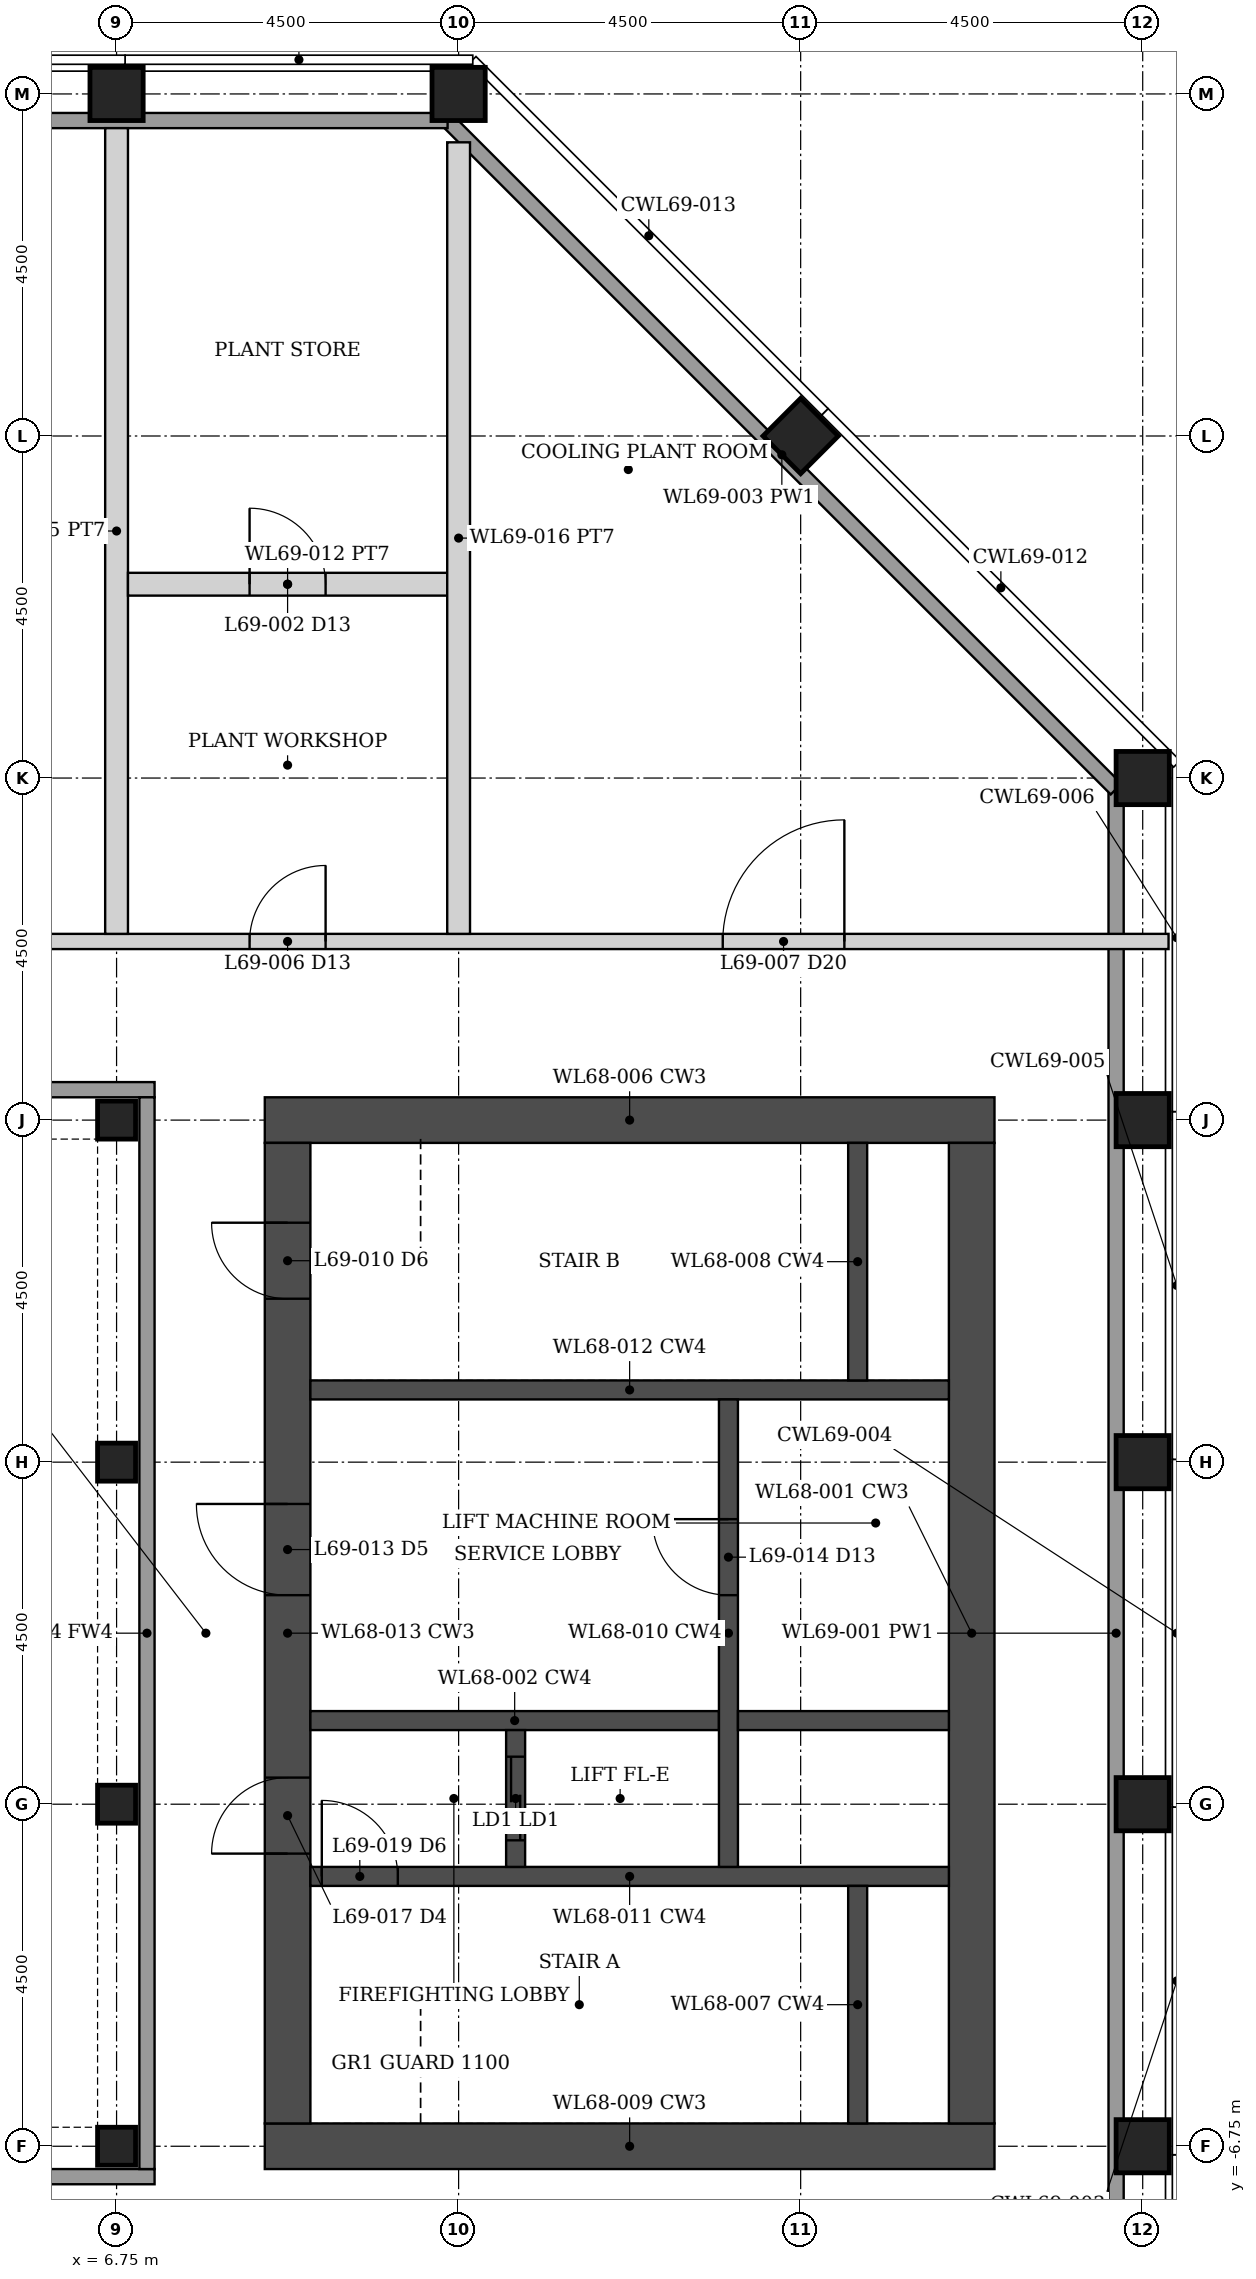
"""IFC4 building model, lengths in metres.
Left out: names, types, materials, properties, quantities, classifications, styles, units other than length and angle.
Written with IfcOpenShell. Run it as: python <this file> out.ifc"""

import sys

from ifc_helpers import new_model, si_unit, direction, frame, frame_2d, origin, origin_2d, place, context, subcontext, project, spatial, rectangle, hollow_rectangle, extrude, element, fill, save


model = new_model("IFC4")
c1 = context("Model", 3, precision=1e-05, world=origin(), true_north=direction((0.0, 1.0)))
c2 = subcontext(c1, "Body", "Model", "MODEL_VIEW")
j1 = project(units=[si_unit("LENGTHUNIT", "METRE"), si_unit("PLANEANGLEUNIT", "RADIAN")], contexts=[c1])
p1 = place(None, origin())
s1 = spatial("IfcSite", under=j1, at=p1, CompositionType="ELEMENT")
p2 = place(p1, origin())
s2 = spatial("IfcBuilding", under=s1, at=p2, CompositionType="ELEMENT")
p3 = place(p2, frame((0.0, 0.0, 268.05)))
s3 = spatial("IfcBuildingStorey", under=s2, at=p3, CompositionType="ELEMENT", Elevation=268.05)
for number, where, z_axis, x_axis in (
    (1, (20.25, -6.75, 0.0), (0.0, 0.0, 1.0), (1.0, 0.0, 0.0)),
    (2, (20.25, -2.25, 0.0), (0.0, 0.0, 1.0), (1.0, 0.0, 0.0)),
    (3, (20.25, 2.25, 0.0), (0.0, 0.0, 1.0), (1.0, 0.0, 0.0)),
    (4, (6.75, 20.25, 0.0), (0.0, 0.0, 1.0), (0.0, 1.0, 0.0)),
    (5, (20.25, 6.75, 0.0), (0.0, 0.0, 1.0), (1.0, 0.0, 0.0)),
    (6, (11.25, 20.25, 0.0), (0.0, 0.0, 1.0), (0.0, 1.0, 0.0)),
    (7, (20.25, 11.25, 0.0), (0.0, 0.0, 1.0), (1.0, 0.0, 0.0)),
    (8, (15.75, 15.75, 0.0), (0.0, 0.0, 1.0), (0.707, 0.707, 0.0)),
):
    element("IfcColumn", number, at=place(p3, frame(where, z_axis=z_axis, x_axis=x_axis)), inside=s3, PredefinedType="COLUMN", context=c2, shape_type="SweptSolid", body=[
        extrude(hollow_rectangle(XDim=0.7, YDim=0.7, WallThickness=0.035, at=origin_2d()), origin(), (0.0, 0.0, 1.0), 6.0),
    ])
for number, where, z_axis, x_axis in (
    (9, (6.75, -6.75, 0.0), (0.0, 0.0, 1.0), (1.0, 0.0, 0.0)),
    (10, (6.75, -2.25, 0.0), (0.0, 0.0, 1.0), (1.0, 0.0, 0.0)),
    (11, (6.75, 2.25, 0.0), (0.0, 0.0, 1.0), (1.0, 0.0, 0.0)),
    (12, (6.75, 6.75, 0.0), (0.0, 0.0, 1.0), (1.0, 0.0, 0.0)),
):
    element("IfcColumn", number, at=place(p3, frame(where, z_axis=z_axis, x_axis=x_axis)), inside=s3, PredefinedType="COLUMN", context=c2, shape_type="SweptSolid", body=[
        extrude(hollow_rectangle(XDim=0.5, YDim=0.5, WallThickness=0.025, at=origin_2d()), origin(), (0.0, 0.0, 1.0), 6.0),
    ])
for number, where, z_axis, x_axis in (
    (13, (8.7, -6.75, 0.0), (0.0, 0.0, 1.0), (1.0, 0.0, 0.0)),
    (14, (8.7, 6.75, 0.0), (0.0, 0.0, 1.0), (1.0, 0.0, 0.0)),
):
    element("IfcWall", number, at=place(p3, frame(where, z_axis=z_axis, x_axis=x_axis)), inside=s3, PredefinedType="SHEAR", context=c2, shape_type="SweptSolid", body=[
        extrude(rectangle(XDim=9.6, YDim=0.6, at=frame_2d((4.8, 0.0))), origin(), (0.0, 0.0, 1.0), 6.0),
    ])
p4 = place(p3, frame((9.0, -6.45, 0.0), z_axis=(0.0, 0.0, 1.0), x_axis=(0.0, 1.0, 0.0)))
e15 = element("IfcWall", 15, at=p4, inside=s3, PredefinedType="SHEAR", context=c2, shape_type="SweptSolid", body=[
    extrude(rectangle(XDim=12.9, YDim=0.6, at=frame_2d((6.45, 0.0))), origin(), (0.0, 0.0, 1.0), 6.0),
])
p5 = place(p4, frame((3.55, 0.0, 0.0)))
e16 = element("IfcOpeningElement", 16, at=p5, cuts=e15, PredefinedType="OPENING", context=c2, shape_type="SweptSolid", body=[
    extrude(rectangle(XDim=1.0, YDim=2.1, at=frame_2d((0.5, 1.05))), frame((0.0, 0.31, 0.0), z_axis=(0.0, -1.0, 0.0), x_axis=(1.0, 0.0, 0.0)), (0.0, 0.0, 1.0), 0.62),
])
p6 = place(p4, frame((6.95, 0.0, 0.0)))
e17 = element("IfcOpeningElement", 17, at=p6, cuts=e15, PredefinedType="OPENING", context=c2, shape_type="SweptSolid", body=[
    extrude(rectangle(XDim=1.2, YDim=2.1, at=frame_2d((0.6, 1.05))), frame((0.0, 0.31, 0.0), z_axis=(0.0, -1.0, 0.0), x_axis=(1.0, 0.0, 0.0)), (0.0, 0.0, 1.0), 0.62),
])
p7 = place(p4, frame((10.85, 0.0, 0.0)))
e18 = element("IfcOpeningElement", 18, at=p7, cuts=e15, PredefinedType="OPENING", context=c2, shape_type="SweptSolid", body=[
    extrude(rectangle(XDim=1.0, YDim=2.1, at=frame_2d((0.5, 1.05))), frame((0.0, 0.31, 0.0), z_axis=(0.0, -1.0, 0.0), x_axis=(1.0, 0.0, 0.0)), (0.0, 0.0, 1.0), 0.62),
])
p8 = place(p3, frame((18.0, -6.45, 0.0), z_axis=(0.0, 0.0, 1.0), x_axis=(0.0, 1.0, 0.0)))
e19 = element("IfcWall", 19, at=p8, inside=s3, PredefinedType="SHEAR", context=c2, shape_type="SweptSolid", body=[
    extrude(rectangle(XDim=12.9, YDim=0.6, at=frame_2d((6.45, 0.0))), origin(), (0.0, 0.0, 1.0), 6.0),
])
p9 = place(p3, frame((9.3, -3.2, 0.0), z_axis=(0.0, 0.0, 1.0), x_axis=(1.0, 0.0, 0.0)))
e20 = element("IfcWall", 20, at=p9, inside=s3, PredefinedType="SHEAR", context=c2, shape_type="SweptSolid", body=[
    extrude(rectangle(XDim=8.4, YDim=0.25, at=frame_2d((4.2, 0.0))), origin(), (0.0, 0.0, 1.0), 6.0),
])
p10 = place(p9, frame((0.15, 0.0, 0.0)))
e21 = element("IfcOpeningElement", 21, at=p10, cuts=e20, PredefinedType="OPENING", context=c2, shape_type="SweptSolid", body=[
    extrude(rectangle(XDim=1.0, YDim=2.1, at=frame_2d((0.5, 1.05))), frame((0.0, 0.135, 0.0), z_axis=(0.0, -1.0, 0.0), x_axis=(1.0, 0.0, 0.0)), (0.0, 0.0, 1.0), 0.27),
])
p11 = place(p3, frame((9.3, 3.2, 0.0), z_axis=(0.0, 0.0, 1.0), x_axis=(1.0, 0.0, 0.0)))
e22 = element("IfcWall", 22, at=p11, inside=s3, PredefinedType="SHEAR", context=c2, shape_type="SweptSolid", body=[
    extrude(rectangle(XDim=8.4, YDim=0.25, at=frame_2d((4.2, 0.0))), origin(), (0.0, 0.0, 1.0), 6.0),
])
for number, where, z_axis, x_axis in (
    (23, (16.5, -6.45, 0.0), (0.0, 0.0, 1.0), (0.0, 1.0, 0.0)),
    (24, (16.5, 3.325, 0.0), (0.0, 0.0, 1.0), (0.0, 1.0, 0.0)),
):
    element("IfcWall", number, at=place(p3, frame(where, z_axis=z_axis, x_axis=x_axis)), inside=s3, PredefinedType="SHEAR", context=c2, shape_type="SweptSolid", body=[
        extrude(rectangle(XDim=3.125, YDim=0.25, at=frame_2d((1.562, 0.0))), origin(), (0.0, 0.0, 1.0), 6.0),
    ])
p12 = place(p3, frame((9.3, -1.15, 0.0), z_axis=(0.0, 0.0, 1.0), x_axis=(1.0, 0.0, 0.0)))
e25 = element("IfcWall", 25, at=p12, inside=s3, PredefinedType="SHEAR", context=c2, shape_type="SweptSolid", body=[
    extrude(rectangle(XDim=5.375, YDim=0.25, at=frame_2d((2.688, 0.0))), origin(), (0.0, 0.0, 1.0), 6.0),
])
p13 = place(p3, frame((12.0, -3.075, 0.0), z_axis=(0.0, 0.0, 1.0), x_axis=(0.0, 1.0, 0.0)))
e26 = element("IfcWall", 26, at=p13, inside=s3, PredefinedType="SHEAR", context=c2, shape_type="SweptSolid", body=[
    extrude(rectangle(XDim=1.8, YDim=0.25, at=frame_2d((0.9, 0.0))), origin(), (0.0, 0.0, 1.0), 6.0),
])
p14 = place(p13, frame((0.35, 0.0, 0.0)))
e27 = element("IfcOpeningElement", 27, at=p14, cuts=e26, PredefinedType="OPENING", context=c2, shape_type="SweptSolid", body=[
    extrude(rectangle(XDim=1.1, YDim=2.1, at=frame_2d((0.55, 1.05))), frame((0.0, 0.135, 0.0), z_axis=(0.0, -1.0, 0.0), x_axis=(1.0, 0.0, 0.0)), (0.0, 0.0, 1.0), 0.27),
])
p15 = place(p3, frame((14.8, -3.075, 0.0), z_axis=(0.0, 0.0, 1.0), x_axis=(0.0, 1.0, 0.0)))
e28 = element("IfcWall", 28, at=p15, inside=s3, PredefinedType="SHEAR", context=c2, shape_type="SweptSolid", body=[
    extrude(rectangle(XDim=6.15, YDim=0.25, at=frame_2d((3.075, 0.0))), origin(), (0.0, 0.0, 1.0), 6.0),
])
p16 = place(p15, frame((3.575, 0.0, 0.0)))
e29 = element("IfcOpeningElement", 29, at=p16, cuts=e28, PredefinedType="OPENING", context=c2, shape_type="SweptSolid", body=[
    extrude(rectangle(XDim=1.0, YDim=2.1, at=frame_2d((0.5, 1.05))), frame((0.0, 0.135, 0.0), z_axis=(0.0, -1.0, 0.0), x_axis=(1.0, 0.0, 0.0)), (0.0, 0.0, 1.0), 0.27),
])
p17 = place(p3, frame((14.925, -1.15, 0.0), z_axis=(0.0, 0.0, 1.0), x_axis=(1.0, 0.0, 0.0)))
e30 = element("IfcWall", 30, at=p17, inside=s3, PredefinedType="SHEAR", context=c2, shape_type="SweptSolid", body=[
    extrude(rectangle(XDim=2.775, YDim=0.25, at=frame_2d((1.387, 0.0))), origin(), (0.0, 0.0, 1.0), 6.0),
])
for number, where, z_axis, x_axis in (
    (31, (-7.25, 7.15, 0.0), (0.0, 0.0, 1.0), (1.0, 0.0, 0.0)),
    (32, (-7.25, -7.15, 0.0), (0.0, 0.0, 1.0), (1.0, 0.0, 0.0)),
):
    element("IfcWall", number, at=place(p3, frame(where, z_axis=z_axis, x_axis=x_axis)), inside=s3, PredefinedType="SOLIDWALL", context=c2, shape_type="SweptSolid", body=[
        extrude(rectangle(XDim=14.5, YDim=0.2, at=frame_2d((7.25, 0.0))), origin(), (0.0, 0.0, 1.0), 4.829),
    ])
p18 = place(p3, frame((7.15, -7.05, 0.0), z_axis=(0.0, 0.0, 1.0), x_axis=(0.0, 1.0, 0.0)))
e33 = element("IfcWall", 33, at=p18, inside=s3, PredefinedType="SOLIDWALL", context=c2, shape_type="SweptSolid", body=[
    extrude(rectangle(XDim=14.1, YDim=0.2, at=frame_2d((7.05, 0.0))), origin(), (0.0, 0.0, 1.0), 4.829),
])
p19 = place(p3, frame((19.9, -11.105, 6.0), z_axis=(0.0, 0.0, 1.0), x_axis=(0.0, 1.0, 0.0)))
e34 = element("IfcWall", 34, at=p19, inside=s3, PredefinedType="PARAPET", context=c2, shape_type="SweptSolid", body=[
    extrude(rectangle(XDim=22.21, YDim=0.2, at=frame_2d((11.105, 0.0))), origin(), (0.0, 0.0, 1.0), 1.1),
])
p20 = place(p3, frame((11.105, 19.9, 6.0), z_axis=(0.0, 0.0, 1.0), x_axis=(0.707106781187, -0.707106781187, 0.0)))
e35 = element("IfcWall", 35, at=p20, inside=s3, PredefinedType="PARAPET", context=c2, shape_type="SweptSolid", body=[
    extrude(rectangle(XDim=12.438, YDim=0.2, at=frame_2d((6.219, 0.0))), origin(), (0.0, 0.0, 1.0), 1.1),
])
p21 = place(p3, frame((-11.105, 19.9, 6.0), z_axis=(0.0, 0.0, 1.0), x_axis=(1.0, 0.0, 0.0)))
e36 = element("IfcWall", 36, at=p21, inside=s3, PredefinedType="PARAPET", context=c2, shape_type="SweptSolid", body=[
    extrude(rectangle(XDim=22.21, YDim=0.2, at=frame_2d((11.105, 0.0))), origin(), (0.0, 0.0, 1.0), 1.1),
])
p22 = place(p3, frame((-20.59, 9.1, 0.0), z_axis=(0.0, 0.0, 1.0), x_axis=(1.0, 0.0, 0.0)))
e37 = element("IfcWall", 37, at=p22, inside=s3, PredefinedType="PARTITIONING", context=c2, shape_type="SweptSolid", body=[
    extrude(rectangle(XDim=41.18, YDim=0.2, at=frame_2d((20.59, 0.0))), origin(), (0.0, 0.0, 1.0), 4.829),
])
p23 = place(p22, frame((4.265, 0.0, 0.0)))
e38 = element("IfcOpeningElement", 38, at=p23, cuts=e37, PredefinedType="OPENING", context=c2, shape_type="SweptSolid", body=[
    extrude(rectangle(XDim=1.6, YDim=2.4, at=frame_2d((0.8, 1.2))), frame((0.0, 0.11, 0.0), z_axis=(0.0, -1.0, 0.0), x_axis=(1.0, 0.0, 0.0)), (0.0, 0.0, 1.0), 0.22),
])
p24 = place(p22, frame((13.34, 0.0, 0.0)))
e39 = element("IfcOpeningElement", 39, at=p24, cuts=e37, PredefinedType="OPENING", context=c2, shape_type="SweptSolid", body=[
    extrude(rectangle(XDim=1.0, YDim=2.1, at=frame_2d((0.5, 1.05))), frame((0.0, 0.11, 0.0), z_axis=(0.0, -1.0, 0.0), x_axis=(1.0, 0.0, 0.0)), (0.0, 0.0, 1.0), 0.22),
])
p25 = place(p22, frame((22.04, 0.0, 0.0)))
e40 = element("IfcOpeningElement", 40, at=p25, cuts=e37, PredefinedType="OPENING", context=c2, shape_type="SweptSolid", body=[
    extrude(rectangle(XDim=1.6, YDim=2.4, at=frame_2d((0.8, 1.2))), frame((0.0, 0.11, 0.0), z_axis=(0.0, -1.0, 0.0), x_axis=(1.0, 0.0, 0.0)), (0.0, 0.0, 1.0), 0.22),
])
p26 = place(p22, frame((29.09, 0.0, 0.0)))
e41 = element("IfcOpeningElement", 41, at=p26, cuts=e37, PredefinedType="OPENING", context=c2, shape_type="SweptSolid", body=[
    extrude(rectangle(XDim=1.0, YDim=2.1, at=frame_2d((0.5, 1.05))), frame((0.0, 0.11, 0.0), z_axis=(0.0, -1.0, 0.0), x_axis=(1.0, 0.0, 0.0)), (0.0, 0.0, 1.0), 0.22),
])
p27 = place(p22, frame((35.315, 0.0, 0.0)))
e42 = element("IfcOpeningElement", 42, at=p27, cuts=e37, PredefinedType="OPENING", context=c2, shape_type="SweptSolid", body=[
    extrude(rectangle(XDim=1.6, YDim=2.4, at=frame_2d((0.8, 1.2))), frame((0.0, 0.11, 0.0), z_axis=(0.0, -1.0, 0.0), x_axis=(1.0, 0.0, 0.0)), (0.0, 0.0, 1.0), 0.22),
])
p28 = place(p3, frame((6.75, 9.2, 0.0), z_axis=(0.0, 0.0, 1.0), x_axis=(0.0, 1.0, 0.0)))
e43 = element("IfcWall", 43, at=p28, inside=s3, PredefinedType="PARTITIONING", context=c2, shape_type="SweptSolid", body=[
    extrude(rectangle(XDim=10.6, YDim=0.3, at=frame_2d((5.3, 0.0))), origin(), (0.0, 0.0, 1.0), 4.829),
])
p29 = place(p3, frame((6.9, 13.8, 0.0), z_axis=(0.0, 0.0, 1.0), x_axis=(1.0, 0.0, 0.0)))
e44 = element("IfcWall", 44, at=p29, inside=s3, PredefinedType="PARTITIONING", context=c2, shape_type="SweptSolid", body=[
    extrude(rectangle(XDim=4.2, YDim=0.3, at=frame_2d((2.1, 0.0))), origin(), (0.0, 0.0, 1.0), 4.829),
])
p30 = place(p29, frame((1.6, 0.0, 0.0)))
e45 = element("IfcOpeningElement", 45, at=p30, cuts=e44, PredefinedType="OPENING", context=c2, shape_type="SweptSolid", body=[
    extrude(rectangle(XDim=1.0, YDim=2.1, at=frame_2d((0.5, 1.05))), frame((0.0, 0.16, 0.0), z_axis=(0.0, -1.0, 0.0), x_axis=(1.0, 0.0, 0.0)), (0.0, 0.0, 1.0), 0.32),
])
p31 = place(p3, frame((11.25, 9.2, 0.0), z_axis=(0.0, 0.0, 1.0), x_axis=(0.0, 1.0, 0.0)))
e46 = element("IfcWall", 46, at=p31, inside=s3, PredefinedType="PARTITIONING", context=c2, shape_type="SweptSolid", body=[
    extrude(rectangle(XDim=10.414, YDim=0.3, at=frame_2d((5.207, 0.0))), origin(), (0.0, 0.0, 1.0), 4.829),
])
p32 = place(p26, origin())
e47 = element("IfcDoor", 47, at=p32, inside=s3, OperationType="SINGLE_SWING_RIGHT", PredefinedType="DOOR", context=c2, shape_type="SweptSolid", body=[
    extrude(rectangle(XDim=1.0, YDim=2.1, at=frame_2d((0.5, 1.05))), frame((0.0, 0.025, 0.0), z_axis=(0.0, -1.0, 0.0), x_axis=(1.0, 0.0, 0.0)), (0.0, 0.0, 1.0), 0.05),
])
fill(e41, e47)
p33 = place(p30, origin())
e48 = element("IfcDoor", 48, at=p33, inside=s3, OperationType="SINGLE_SWING_LEFT", PredefinedType="DOOR", context=c2, shape_type="SweptSolid", body=[
    extrude(rectangle(XDim=1.0, YDim=2.1, at=frame_2d((0.5, 1.05))), frame((0.0, 0.025, 0.0), z_axis=(0.0, -1.0, 0.0), x_axis=(1.0, 0.0, 0.0)), (0.0, 0.0, 1.0), 0.05),
])
fill(e45, e48)
p34 = place(p27, origin())
e49 = element("IfcDoor", 49, at=p34, inside=s3, OperationType="SINGLE_SWING_RIGHT", PredefinedType="DOOR", context=c2, shape_type="SweptSolid", body=[
    extrude(rectangle(XDim=1.6, YDim=2.4, at=frame_2d((0.8, 1.2))), frame((0.0, 0.025, 0.0), z_axis=(0.0, -1.0, 0.0), x_axis=(1.0, 0.0, 0.0)), (0.0, 0.0, 1.0), 0.05),
])
fill(e42, e49)
p35 = place(p5, origin())
e50 = element("IfcDoor", 50, at=p35, inside=s3, OperationType="SINGLE_SWING_LEFT", PredefinedType="DOOR", context=c2, shape_type="SweptSolid", body=[
    extrude(rectangle(XDim=1.0, YDim=2.1, at=frame_2d((0.5, 1.05))), frame((0.0, 0.025, 0.0), z_axis=(0.0, -1.0, 0.0), x_axis=(1.0, 0.0, 0.0)), (0.0, 0.0, 1.0), 0.05),
])
fill(e16, e50)
p36 = place(p10, origin())
e51 = element("IfcDoor", 51, at=p36, inside=s3, OperationType="SINGLE_SWING_LEFT", PredefinedType="DOOR", context=c2, shape_type="SweptSolid", body=[
    extrude(rectangle(XDim=1.0, YDim=2.1, at=frame_2d((0.5, 1.05))), frame((0.0, 0.025, 0.0), z_axis=(0.0, -1.0, 0.0), x_axis=(1.0, 0.0, 0.0)), (0.0, 0.0, 1.0), 0.05),
])
fill(e21, e51)
p37 = place(p6, origin())
e52 = element("IfcDoor", 52, at=p37, inside=s3, OperationType="SINGLE_SWING_RIGHT", PredefinedType="DOOR", context=c2, shape_type="SweptSolid", body=[
    extrude(rectangle(XDim=1.2, YDim=2.1, at=frame_2d((0.6, 1.05))), frame((0.0, 0.025, 0.0), z_axis=(0.0, -1.0, 0.0), x_axis=(1.0, 0.0, 0.0)), (0.0, 0.0, 1.0), 0.05),
])
fill(e17, e52)
p38 = place(p16, origin())
e53 = element("IfcDoor", 53, at=p38, inside=s3, OperationType="SINGLE_SWING_RIGHT", PredefinedType="DOOR", context=c2, shape_type="SweptSolid", body=[
    extrude(rectangle(XDim=1.0, YDim=2.1, at=frame_2d((0.5, 1.05))), frame((0.0, 0.025, 0.0), z_axis=(0.0, -1.0, 0.0), x_axis=(1.0, 0.0, 0.0)), (0.0, 0.0, 1.0), 0.05),
])
fill(e29, e53)
p39 = place(p7, origin())
e54 = element("IfcDoor", 54, at=p39, inside=s3, OperationType="SINGLE_SWING_RIGHT", PredefinedType="DOOR", context=c2, shape_type="SweptSolid", body=[
    extrude(rectangle(XDim=1.0, YDim=2.1, at=frame_2d((0.5, 1.05))), frame((0.0, 0.025, 0.0), z_axis=(0.0, -1.0, 0.0), x_axis=(1.0, 0.0, 0.0)), (0.0, 0.0, 1.0), 0.05),
])
fill(e18, e54)
p40 = place(p14, origin())
e55 = element("IfcDoor", 55, at=p40, inside=s3, OperationType="DOUBLE_DOOR_SLIDING", PredefinedType="DOOR", context=c2, shape_type="SweptSolid", body=[
    extrude(rectangle(XDim=1.1, YDim=2.1, at=frame_2d((0.55, 1.05))), frame((0.0, 0.025, 0.0), z_axis=(0.0, -1.0, 0.0), x_axis=(1.0, 0.0, 0.0)), (0.0, 0.0, 1.0), 0.05),
])
fill(e27, e55)
save(model, sys.argv[1])
